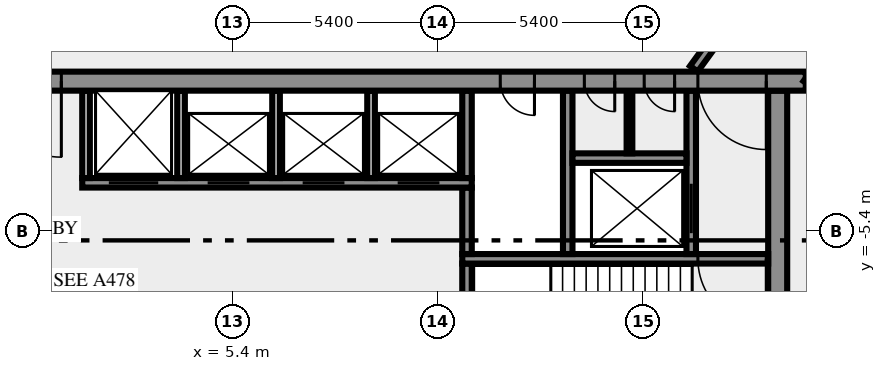
"""IFC4 building model, lengths in metres.
Left out: names, types, materials, properties, quantities, classifications, styles, units other than length and angle.
Written with IfcOpenShell. Run it as: python <this file> out.ifc"""

import sys

from ifc_helpers import new_model, si_unit, direction, frame, frame_2d, origin, place, context, subcontext, project, spatial, rectangle, extrude, element, fill, save


model = new_model("IFC4")
c1 = context("Model", 3, precision=1e-05, world=origin(), true_north=direction((0.0, 1.0)))
c2 = subcontext(c1, "Body", "Model", "MODEL_VIEW")
j1 = project(units=[si_unit("LENGTHUNIT", "METRE"), si_unit("PLANEANGLEUNIT", "RADIAN")], contexts=[c1])
p1 = place(None, origin())
s1 = spatial("IfcSite", under=j1, at=p1, CompositionType="ELEMENT")
p2 = place(p1, origin())
s2 = spatial("IfcBuilding", under=s1, at=p2, CompositionType="ELEMENT")
p3 = place(p2, frame((0.0, 0.0, 144.0)))
s3 = spatial("IfcBuildingStorey", under=s2, at=p3, CompositionType="ELEMENT", Elevation=144.0)
p4 = place(p3, frame((19.75, -10.5, 0.0), z_axis=(0.0, 0.0, 1.0), x_axis=(0.0, 1.0, 0.0)))
e1 = element("IfcWall", 1, at=p4, inside=s3, PredefinedType="SHEAR", context=c2, shape_type="SweptSolid", body=[
    extrude(rectangle(XDim=8.8, YDim=0.5, at=frame_2d((4.4, 0.0))), origin(), (0.0, 0.0, 1.0), 3.65),
])
p5 = place(p3, frame((11.575, -7.25, 0.0), z_axis=(0.0, 0.0, 1.0), x_axis=(0.0, 1.0, 0.0)))
e2 = element("IfcWall", 2, at=p5, inside=s3, PredefinedType="SHEAR", context=c2, shape_type="SweptSolid", body=[
    extrude(rectangle(XDim=1.0, YDim=0.25, at=frame_2d((0.5, 0.0))), origin(), (0.0, 0.0, 1.0), 3.65),
])
p6 = place(p3, frame((19.5, -6.125, 0.0), z_axis=(0.0, 0.0, 1.0), x_axis=(-1.0, 0.0, 0.0)))
e3 = element("IfcWall", 3, at=p6, inside=s3, PredefinedType="SHEAR", context=c2, shape_type="SweptSolid", body=[
    extrude(rectangle(XDim=8.05, YDim=0.25, at=frame_2d((4.025, 0.0))), origin(), (0.0, 0.0, 1.0), 3.65),
])
p7 = place(p6, frame((0.05, 0.0, 0.0)))
e4 = element("IfcOpeningElement", 4, at=p7, cuts=e3, PredefinedType="OPENING", context=c2, shape_type="SweptSolid", body=[
    extrude(rectangle(XDim=1.8, YDim=2.1, at=frame_2d((0.9, 1.05))), frame((0.0, 0.135, 0.0), z_axis=(0.0, -1.0, 0.0), x_axis=(1.0, 0.0, 0.0)), (0.0, 0.0, 1.0), 0.27),
])
p8 = place(p3, frame((11.575, -6.0, 0.0), z_axis=(0.0, 0.0, 1.0), x_axis=(0.0, 1.0, 0.0)))
e5 = element("IfcWall", 5, at=p8, inside=s3, PredefinedType="SHEAR", context=c2, shape_type="SweptSolid", body=[
    extrude(rectangle(XDim=1.75, YDim=0.25, at=frame_2d((0.875, 0.0))), origin(), (0.0, 0.0, 1.0), 3.65),
])
p9 = place(p3, frame((14.225, -6.0, 0.0), z_axis=(0.0, 0.0, 1.0), x_axis=(0.0, 1.0, 0.0)))
e6 = element("IfcWall", 6, at=p9, inside=s3, PredefinedType="SHEAR", context=c2, shape_type="SweptSolid", body=[
    extrude(rectangle(XDim=4.3, YDim=0.25, at=frame_2d((2.15, 0.0))), origin(), (0.0, 0.0, 1.0), 3.65),
])
p10 = place(p3, frame((17.475, -6.0, 0.0), z_axis=(0.0, 0.0, 1.0), x_axis=(0.0, 1.0, 0.0)))
e7 = element("IfcWall", 7, at=p10, inside=s3, PredefinedType="SHEAR", context=c2, shape_type="SweptSolid", body=[
    extrude(rectangle(XDim=4.3, YDim=0.25, at=frame_2d((2.15, 0.0))), origin(), (0.0, 0.0, 1.0), 3.65),
])
p11 = place(p10, frame((0.55, 0.0, 0.0)))
e8 = element("IfcOpeningElement", 8, at=p11, cuts=e7, PredefinedType="OPENING", context=c2, shape_type="SweptSolid", body=[
    extrude(rectangle(XDim=1.3, YDim=2.1, at=frame_2d((0.65, 1.05))), frame((0.0, 0.135, 0.0), z_axis=(0.0, -1.0, 0.0), x_axis=(1.0, 0.0, 0.0)), (0.0, 0.0, 1.0), 0.27),
])
p12 = place(p3, frame((1.45, -4.125, 0.0), z_axis=(0.0, 0.0, 1.0), x_axis=(1.0, 0.0, 0.0)))
e9 = element("IfcWall", 9, at=p12, inside=s3, PredefinedType="SHEAR", context=c2, shape_type="SweptSolid", body=[
    extrude(rectangle(XDim=10.25, YDim=0.25, at=frame_2d((5.125, 0.0))), origin(), (0.0, 0.0, 1.0), 3.65),
])
p13 = place(p12, frame((0.7, 0.0, 0.0)))
e10 = element("IfcOpeningElement", 10, at=p13, cuts=e9, PredefinedType="OPENING", context=c2, shape_type="SweptSolid", body=[
    extrude(rectangle(XDim=1.3, YDim=2.1, at=frame_2d((0.65, 1.05))), frame((0.0, 0.135, 0.0), z_axis=(0.0, -1.0, 0.0), x_axis=(1.0, 0.0, 0.0)), (0.0, 0.0, 1.0), 0.27),
])
p14 = place(p12, frame((3.3, 0.0, 0.0)))
e11 = element("IfcOpeningElement", 11, at=p14, cuts=e9, PredefinedType="OPENING", context=c2, shape_type="SweptSolid", body=[
    extrude(rectangle(XDim=1.1, YDim=2.1, at=frame_2d((0.55, 1.05))), frame((0.0, 0.135, 0.0), z_axis=(0.0, -1.0, 0.0), x_axis=(1.0, 0.0, 0.0)), (0.0, 0.0, 1.0), 0.27),
])
p15 = place(p12, frame((5.8, 0.0, 0.0)))
e12 = element("IfcOpeningElement", 12, at=p15, cuts=e9, PredefinedType="OPENING", context=c2, shape_type="SweptSolid", body=[
    extrude(rectangle(XDim=1.1, YDim=2.1, at=frame_2d((0.55, 1.05))), frame((0.0, 0.135, 0.0), z_axis=(0.0, -1.0, 0.0), x_axis=(1.0, 0.0, 0.0)), (0.0, 0.0, 1.0), 0.27),
])
p16 = place(p12, frame((8.3, 0.0, 0.0)))
e13 = element("IfcOpeningElement", 13, at=p16, cuts=e9, PredefinedType="OPENING", context=c2, shape_type="SweptSolid", body=[
    extrude(rectangle(XDim=1.1, YDim=2.1, at=frame_2d((0.55, 1.05))), frame((0.0, 0.135, 0.0), z_axis=(0.0, -1.0, 0.0), x_axis=(1.0, 0.0, 0.0)), (0.0, 0.0, 1.0), 0.27),
])
for number, where, z_axis, x_axis in (
    (14, (1.55, -4.0, 0.0), (0.0, 0.0, 1.0), (0.0, 1.0, 0.0)),
    (15, (4.05, -4.0, 0.0), (0.0, 0.0, 1.0), (0.0, 1.0, 0.0)),
    (16, (6.55, -4.0, 0.0), (0.0, 0.0, 1.0), (0.0, 1.0, 0.0)),
    (17, (9.05, -4.0, 0.0), (0.0, 0.0, 1.0), (0.0, 1.0, 0.0)),
):
    element("IfcWall", number, at=place(p3, frame(where, z_axis=z_axis, x_axis=x_axis)), inside=s3, PredefinedType="SOLIDWALL", context=c2, shape_type="SweptSolid", body=[
        extrude(rectangle(XDim=2.3, YDim=0.2, at=frame_2d((1.15, 0.0))), origin(), (0.0, 0.0, 1.0), 3.65),
    ])
p17 = place(p3, frame((11.575, -4.0, 0.0), z_axis=(0.0, 0.0, 1.0), x_axis=(0.0, 1.0, 0.0)))
e18 = element("IfcWall", 18, at=p17, inside=s3, PredefinedType="SHEAR", context=c2, shape_type="SweptSolid", body=[
    extrude(rectangle(XDim=2.3, YDim=0.25, at=frame_2d((1.15, 0.0))), origin(), (0.0, 0.0, 1.0), 3.65),
])
p18 = place(p3, frame((14.35, -3.475, 0.0), z_axis=(0.0, 0.0, 1.0), x_axis=(1.0, 0.0, 0.0)))
e19 = element("IfcWall", 19, at=p18, inside=s3, PredefinedType="SHEAR", context=c2, shape_type="SweptSolid", body=[
    extrude(rectangle(XDim=3.0, YDim=0.25, at=frame_2d((1.5, 0.0))), origin(), (0.0, 0.0, 1.0), 3.65),
])
p19 = place(p3, frame((15.85, -3.35, 0.0), z_axis=(0.0, 0.0, 1.0), x_axis=(0.0, 1.0, 0.0)))
e20 = element("IfcWall", 20, at=p19, inside=s3, PredefinedType="PARTITIONING", context=c2, shape_type="SweptSolid", body=[
    extrude(rectangle(XDim=1.65, YDim=0.15, at=frame_2d((0.825, 0.0))), origin(), (0.0, 0.0, 1.0), 3.65),
])
p20 = place(p3, frame((20.49, -1.45, 0.0), z_axis=(0.0, 0.0, 1.0), x_axis=(-1.0, 0.0, 0.0)))
e21 = element("IfcWall", 21, at=p20, inside=s3, PredefinedType="SHEAR", context=c2, shape_type="SweptSolid", body=[
    extrude(rectangle(XDim=40.98, YDim=0.5, at=frame_2d((20.49, 0.0))), origin(), (0.0, 0.0, 1.0), 3.65),
])
p21 = place(p20, frame((38.14, 0.0, 0.0)))
e22 = element("IfcOpeningElement", 22, at=p21, cuts=e21, PredefinedType="OPENING", context=c2, shape_type="SweptSolid", body=[
    extrude(rectangle(XDim=1.8, YDim=2.1, at=frame_2d((0.9, 1.05))), frame((0.0, 0.26, 0.0), z_axis=(0.0, -1.0, 0.0), x_axis=(1.0, 0.0, 0.0)), (0.0, 0.0, 1.0), 0.52),
])
p22 = place(p20, frame((35.89, 0.0, 0.0)))
e23 = element("IfcOpeningElement", 23, at=p22, cuts=e21, PredefinedType="OPENING", context=c2, shape_type="SweptSolid", body=[
    extrude(rectangle(XDim=0.9, YDim=2.1, at=frame_2d((0.45, 1.05))), frame((0.0, 0.26, 0.0), z_axis=(0.0, -1.0, 0.0), x_axis=(1.0, 0.0, 0.0)), (0.0, 0.0, 1.0), 0.52),
])
p23 = place(p20, frame((32.94, 0.0, 0.0)))
e24 = element("IfcOpeningElement", 24, at=p23, cuts=e21, PredefinedType="OPENING", context=c2, shape_type="SweptSolid", body=[
    extrude(rectangle(XDim=0.9, YDim=2.1, at=frame_2d((0.45, 1.05))), frame((0.0, 0.26, 0.0), z_axis=(0.0, -1.0, 0.0), x_axis=(1.0, 0.0, 0.0)), (0.0, 0.0, 1.0), 0.52),
])
p24 = place(p20, frame((29.802, 0.0, 0.0)))
e25 = element("IfcOpeningElement", 25, at=p24, cuts=e21, PredefinedType="OPENING", context=c2, shape_type="SweptSolid", body=[
    extrude(rectangle(XDim=0.9, YDim=2.1, at=frame_2d((0.45, 1.05))), frame((0.0, 0.26, 0.0), z_axis=(0.0, -1.0, 0.0), x_axis=(1.0, 0.0, 0.0)), (0.0, 0.0, 1.0), 0.52),
])
p25 = place(p20, frame((26.077, 0.0, 0.0)))
e26 = element("IfcOpeningElement", 26, at=p25, cuts=e21, PredefinedType="OPENING", context=c2, shape_type="SweptSolid", body=[
    extrude(rectangle(XDim=0.9, YDim=2.1, at=frame_2d((0.45, 1.05))), frame((0.0, 0.26, 0.0), z_axis=(0.0, -1.0, 0.0), x_axis=(1.0, 0.0, 0.0)), (0.0, 0.0, 1.0), 0.52),
])
p26 = place(p20, frame((19.59, 0.0, 0.0)))
e27 = element("IfcOpeningElement", 27, at=p26, cuts=e21, PredefinedType="OPENING", context=c2, shape_type="SweptSolid", body=[
    extrude(rectangle(XDim=2.0, YDim=2.1, at=frame_2d((1.0, 1.05))), frame((0.0, 0.26, 0.0), z_axis=(0.0, -1.0, 0.0), x_axis=(1.0, 0.0, 0.0)), (0.0, 0.0, 1.0), 0.52),
])
p27 = place(p20, frame((7.14, 0.0, 0.0)))
e28 = element("IfcOpeningElement", 28, at=p27, cuts=e21, PredefinedType="OPENING", context=c2, shape_type="SweptSolid", body=[
    extrude(rectangle(XDim=0.9, YDim=2.1, at=frame_2d((0.45, 1.05))), frame((0.0, 0.26, 0.0), z_axis=(0.0, -1.0, 0.0), x_axis=(1.0, 0.0, 0.0)), (0.0, 0.0, 1.0), 0.52),
])
p28 = place(p20, frame((5.028, 0.0, 0.0)))
e29 = element("IfcOpeningElement", 29, at=p28, cuts=e21, PredefinedType="OPENING", context=c2, shape_type="SweptSolid", body=[
    extrude(rectangle(XDim=0.8, YDim=2.1, at=frame_2d((0.4, 1.05))), frame((0.0, 0.26, 0.0), z_axis=(0.0, -1.0, 0.0), x_axis=(1.0, 0.0, 0.0)), (0.0, 0.0, 1.0), 0.52),
])
p29 = place(p20, frame((3.452, 0.0, 0.0)))
e30 = element("IfcOpeningElement", 30, at=p29, cuts=e21, PredefinedType="OPENING", context=c2, shape_type="SweptSolid", body=[
    extrude(rectangle(XDim=0.8, YDim=2.1, at=frame_2d((0.4, 1.05))), frame((0.0, 0.26, 0.0), z_axis=(0.0, -1.0, 0.0), x_axis=(1.0, 0.0, 0.0)), (0.0, 0.0, 1.0), 0.52),
])
p30 = place(p20, frame((1.04, 0.0, 0.0)))
e31 = element("IfcOpeningElement", 31, at=p30, cuts=e21, PredefinedType="OPENING", context=c2, shape_type="SweptSolid", body=[
    extrude(rectangle(XDim=1.8, YDim=2.1, at=frame_2d((0.9, 1.05))), frame((0.0, 0.26, 0.0), z_axis=(0.0, -1.0, 0.0), x_axis=(1.0, 0.0, 0.0)), (0.0, 0.0, 1.0), 0.52),
])
p31 = place(p3, frame((17.545, -1.125, 0.0), z_axis=(0.0, 0.0, 1.0), x_axis=(0.587786330937, 0.809016210693, 0.0)))
e32 = element("IfcWall", 32, at=p31, inside=s3, PredefinedType="SOLIDWALL", context=c2, shape_type="SweptSolid", body=[
    extrude(rectangle(XDim=30.103, YDim=0.25, at=frame_2d((15.052, 0.0))), origin(), (0.0, 0.0, 1.0), 3.65),
])
p32 = place(p31, frame((3.441, 0.0, 0.0)))
e33 = element("IfcOpeningElement", 33, at=p32, cuts=e32, PredefinedType="OPENING", context=c2, shape_type="SweptSolid", body=[
    extrude(rectangle(XDim=0.9, YDim=2.1, at=frame_2d((0.45, 1.05))), frame((0.0, 0.135, 0.0), z_axis=(0.0, -1.0, 0.0), x_axis=(1.0, 0.0, 0.0)), (0.0, 0.0, 1.0), 0.27),
])
p33 = place(p31, frame((20.457, 0.0, 0.0)))
e34 = element("IfcOpeningElement", 34, at=p33, cuts=e32, PredefinedType="OPENING", context=c2, shape_type="SweptSolid", body=[
    extrude(rectangle(XDim=0.9, YDim=2.1, at=frame_2d((0.45, 1.05))), frame((0.0, 0.135, 0.0), z_axis=(0.0, -1.0, 0.0), x_axis=(1.0, 0.0, 0.0)), (0.0, 0.0, 1.0), 0.27),
])
p34 = place(p31, frame((18.858, 0.0, 0.0)))
e35 = element("IfcOpeningElement", 35, at=p34, cuts=e32, PredefinedType="OPENING", context=c2, shape_type="SweptSolid", body=[
    extrude(rectangle(XDim=0.9, YDim=2.1, at=frame_2d((0.45, 1.05))), frame((0.0, 0.135, 0.0), z_axis=(0.0, -1.0, 0.0), x_axis=(1.0, 0.0, 0.0)), (0.0, 0.0, 1.0), 0.27),
])
p35 = place(p3, frame((37.236, 21.469, 0.0), z_axis=(0.0, 0.0, 1.0), x_axis=(-0.58778344073, -0.809018310549, 0.0)))
e36 = element("IfcWall", 36, at=p35, inside=s3, PredefinedType="SOLIDWALL", context=c2, shape_type="SweptSolid", body=[
    extrude(rectangle(XDim=28.42, YDim=0.25, at=frame_2d((14.21, 0.0))), origin(), (0.0, 0.0, 1.0), 3.65),
])
p36 = place(p35, frame((26.988, 0.0, 0.0)))
e37 = element("IfcOpeningElement", 37, at=p36, cuts=e36, PredefinedType="OPENING", context=c2, shape_type="SweptSolid", body=[
    extrude(rectangle(XDim=0.9, YDim=2.1, at=frame_2d((0.45, 1.05))), frame((0.0, 0.135, 0.0), z_axis=(0.0, -1.0, 0.0), x_axis=(1.0, 0.0, 0.0)), (0.0, 0.0, 1.0), 0.27),
])
p37 = place(p35, frame((0.224, 0.0, 0.0)))
e38 = element("IfcOpeningElement", 38, at=p37, cuts=e36, PredefinedType="OPENING", context=c2, shape_type="SweptSolid", body=[
    extrude(rectangle(XDim=0.9, YDim=2.1, at=frame_2d((0.45, 1.05))), frame((0.0, 0.135, 0.0), z_axis=(0.0, -1.0, 0.0), x_axis=(1.0, 0.0, 0.0)), (0.0, 0.0, 1.0), 0.27),
])
p38 = place(p35, frame((9.155, 0.0, 0.0)))
e39 = element("IfcOpeningElement", 39, at=p38, cuts=e36, PredefinedType="OPENING", context=c2, shape_type="SweptSolid", body=[
    extrude(rectangle(XDim=0.9, YDim=2.1, at=frame_2d((0.45, 1.05))), frame((0.0, 0.135, 0.0), z_axis=(0.0, -1.0, 0.0), x_axis=(1.0, 0.0, 0.0)), (0.0, 0.0, 1.0), 0.27),
])
p39 = place(p7, origin())
e40 = element("IfcDoor", 40, at=p39, inside=s3, OperationType="DOUBLE_DOOR_SINGLE_SWING", PredefinedType="DOOR", context=c2, shape_type="SweptSolid", body=[
    extrude(rectangle(XDim=1.8, YDim=2.1, at=frame_2d((0.9, 1.05))), frame((0.0, 0.025, 0.0), z_axis=(0.0, -1.0, 0.0), x_axis=(1.0, 0.0, 0.0)), (0.0, 0.0, 1.0), 0.05),
])
fill(e4, e40)
p40 = place(p11, origin())
e41 = element("IfcDoor", 41, at=p40, inside=s3, OperationType="DOUBLE_DOOR_SLIDING", PredefinedType="DOOR", context=c2, shape_type="SweptSolid", body=[
    extrude(rectangle(XDim=1.3, YDim=2.1, at=frame_2d((0.65, 1.05))), frame((0.0, 0.025, 0.0), z_axis=(0.0, -1.0, 0.0), x_axis=(1.0, 0.0, 0.0)), (0.0, 0.0, 1.0), 0.05),
])
fill(e8, e41)
p41 = place(p13, origin())
e42 = element("IfcDoor", 42, at=p41, inside=s3, OperationType="DOUBLE_DOOR_SLIDING", PredefinedType="DOOR", context=c2, shape_type="SweptSolid", body=[
    extrude(rectangle(XDim=1.3, YDim=2.1, at=frame_2d((0.65, 1.05))), frame((0.0, 0.025, 0.0), z_axis=(0.0, -1.0, 0.0), x_axis=(1.0, 0.0, 0.0)), (0.0, 0.0, 1.0), 0.05),
])
fill(e10, e42)
p42 = place(p14, origin())
e43 = element("IfcDoor", 43, at=p42, inside=s3, OperationType="DOUBLE_DOOR_SLIDING", PredefinedType="DOOR", context=c2, shape_type="SweptSolid", body=[
    extrude(rectangle(XDim=1.1, YDim=2.1, at=frame_2d((0.55, 1.05))), frame((0.0, 0.025, 0.0), z_axis=(0.0, -1.0, 0.0), x_axis=(1.0, 0.0, 0.0)), (0.0, 0.0, 1.0), 0.05),
])
fill(e11, e43)
p43 = place(p15, origin())
e44 = element("IfcDoor", 44, at=p43, inside=s3, OperationType="DOUBLE_DOOR_SLIDING", PredefinedType="DOOR", context=c2, shape_type="SweptSolid", body=[
    extrude(rectangle(XDim=1.1, YDim=2.1, at=frame_2d((0.55, 1.05))), frame((0.0, 0.025, 0.0), z_axis=(0.0, -1.0, 0.0), x_axis=(1.0, 0.0, 0.0)), (0.0, 0.0, 1.0), 0.05),
])
fill(e12, e44)
p44 = place(p16, origin())
e45 = element("IfcDoor", 45, at=p44, inside=s3, OperationType="DOUBLE_DOOR_SLIDING", PredefinedType="DOOR", context=c2, shape_type="SweptSolid", body=[
    extrude(rectangle(XDim=1.1, YDim=2.1, at=frame_2d((0.55, 1.05))), frame((0.0, 0.025, 0.0), z_axis=(0.0, -1.0, 0.0), x_axis=(1.0, 0.0, 0.0)), (0.0, 0.0, 1.0), 0.05),
])
fill(e13, e45)
p45 = place(p26, origin())
e46 = element("IfcDoor", 46, at=p45, inside=s3, OperationType="DOUBLE_DOOR_SINGLE_SWING", PredefinedType="DOOR", context=c2, shape_type="SweptSolid", body=[
    extrude(rectangle(XDim=2.0, YDim=2.1, at=frame_2d((1.0, 1.05))), frame((0.0, 0.025, 0.0), z_axis=(0.0, -1.0, 0.0), x_axis=(1.0, 0.0, 0.0)), (0.0, 0.0, 1.0), 0.05),
])
fill(e27, e46)
p46 = place(p27, origin())
e47 = element("IfcDoor", 47, at=p46, inside=s3, OperationType="SINGLE_SWING_LEFT", PredefinedType="DOOR", context=c2, shape_type="SweptSolid", body=[
    extrude(rectangle(XDim=0.9, YDim=2.1, at=frame_2d((0.45, 1.05))), frame((0.0, 0.025, 0.0), z_axis=(0.0, -1.0, 0.0), x_axis=(1.0, 0.0, 0.0)), (0.0, 0.0, 1.0), 0.05),
])
fill(e28, e47)
p47 = place(p28, origin())
e48 = element("IfcDoor", 48, at=p47, inside=s3, OperationType="SINGLE_SWING_LEFT", PredefinedType="DOOR", context=c2, shape_type="SweptSolid", body=[
    extrude(rectangle(XDim=0.8, YDim=2.1, at=frame_2d((0.4, 1.05))), frame((0.0, 0.025, 0.0), z_axis=(0.0, -1.0, 0.0), x_axis=(1.0, 0.0, 0.0)), (0.0, 0.0, 1.0), 0.05),
])
fill(e29, e48)
p48 = place(p29, origin())
e49 = element("IfcDoor", 49, at=p48, inside=s3, OperationType="SINGLE_SWING_LEFT", PredefinedType="DOOR", context=c2, shape_type="SweptSolid", body=[
    extrude(rectangle(XDim=0.8, YDim=2.1, at=frame_2d((0.4, 1.05))), frame((0.0, 0.025, 0.0), z_axis=(0.0, -1.0, 0.0), x_axis=(1.0, 0.0, 0.0)), (0.0, 0.0, 1.0), 0.05),
])
fill(e30, e49)
p49 = place(p30, origin())
e50 = element("IfcDoor", 50, at=p49, inside=s3, OperationType="DOUBLE_DOOR_SINGLE_SWING", PredefinedType="DOOR", context=c2, shape_type="SweptSolid", body=[
    extrude(rectangle(XDim=1.8, YDim=2.1, at=frame_2d((0.9, 1.05))), frame((0.0, 0.025, 0.0), z_axis=(0.0, -1.0, 0.0), x_axis=(1.0, 0.0, 0.0)), (0.0, 0.0, 1.0), 0.05),
])
fill(e31, e50)
save(model, sys.argv[1])
